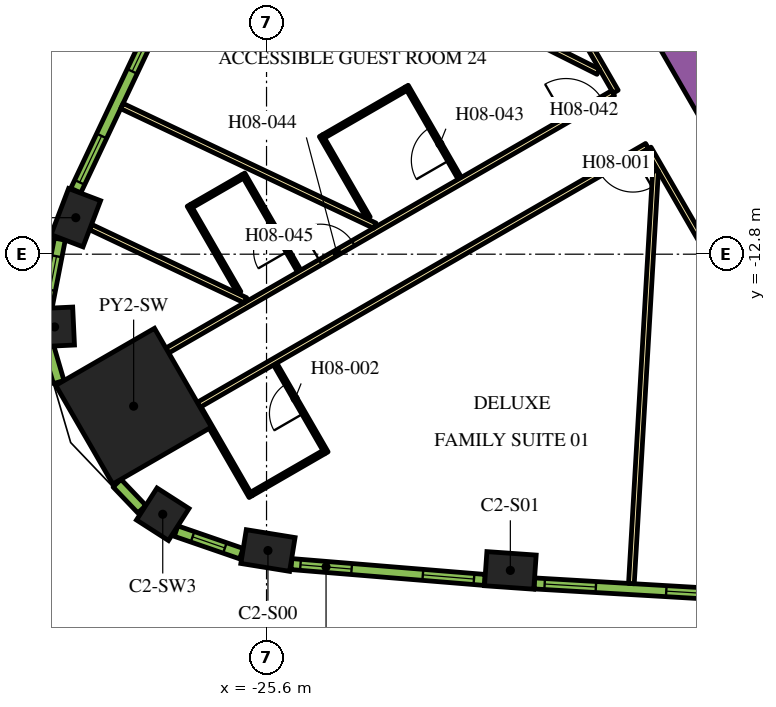
"""IFC4 building model, lengths in metres.
Left out: names, types, materials, properties, quantities, classifications, styles, units other than length and angle.
Written with IfcOpenShell. Run it as: python <this file> out.ifc"""

import sys

from ifc_helpers import new_model, si_unit, direction, frame, frame_2d, origin, origin_2d, place, context, subcontext, project, spatial, rectangle, extrude, element, fill, save


model = new_model("IFC4")
c1 = context("Model", 3, precision=1e-05, world=origin(), true_north=direction((0.0, 1.0)))
c2 = subcontext(c1, "Body", "Model", "MODEL_VIEW")
j1 = project(units=[si_unit("LENGTHUNIT", "METRE"), si_unit("PLANEANGLEUNIT", "RADIAN")], contexts=[c1])
p1 = place(None, origin())
s1 = spatial("IfcSite", under=j1, at=p1, CompositionType="ELEMENT")
p2 = place(p1, origin())
s2 = spatial("IfcBuilding", under=s1, at=p2, CompositionType="ELEMENT")
p3 = place(p2, frame((0.0, 0.0, 111.0)))
s3 = spatial("IfcBuildingStorey", under=s2, at=p3, CompositionType="ELEMENT", Elevation=111.0)
p4 = place(p3, frame((-29.097, -16.799, 0.0), z_axis=(0.0, 0.0, 1.0), x_axis=(-0.866025403784, -0.5, 0.0)))
e1 = element("IfcColumn", 1, at=p4, inside=s3, PredefinedType="COLUMN", context=c2, shape_type="SweptSolid", body=[
    extrude(rectangle(XDim=3.0, YDim=3.0, at=origin_2d()), origin(), (0.0, 0.0, 1.0), 3.9),
])
for number, where, z_axis, x_axis in (
    (2, (-25.563, -20.597, 0.0), (0.0, 0.0, 1.0), (0.987, -0.159, 0.0)),
    (3, (-19.184, -21.12, 0.0), (0.0, 0.0, 1.0), (0.998, -0.07, 0.0)),
    (4, (-30.619, -11.839, 0.0), (0.0, 0.0, 1.0), (-0.355, -0.935, 0.0)),
):
    element("IfcColumn", number, at=place(p3, frame(where, z_axis=z_axis, x_axis=x_axis)), inside=s3, PredefinedType="COLUMN", context=c2, shape_type="SweptSolid", body=[
        extrude(rectangle(XDim=1.3, YDim=0.9, at=origin_2d()), origin(), (0.0, 0.0, 1.0), 3.9),
    ])
for number, where, z_axis, x_axis in (
    (5, (-31.177, -14.714, 0.0), (0.0, 0.0, 1.0), (0.047, -0.999, 0.0)),
    (6, (-28.331, -19.643, 0.0), (0.0, 0.0, 1.0), (0.842, -0.54, 0.0)),
):
    element("IfcColumn", number, at=place(p3, frame(where, z_axis=z_axis, x_axis=x_axis)), inside=s3, PredefinedType="COLUMN", context=c2, shape_type="SweptSolid", body=[
        extrude(rectangle(XDim=1.0, YDim=1.0, at=origin_2d()), origin(), (0.0, 0.0, 1.0), 3.9),
    ])
p5 = place(p3, frame((-12.134, -11.883, 0.0), z_axis=(0.0, 0.0, 1.0), x_axis=(-0.500005339912, 0.866022320763, 0.0)))
e7 = element("IfcWall", 7, at=p5, inside=s3, PredefinedType="SOLIDWALL", context=c2, shape_type="SweptSolid", body=[
    extrude(rectangle(XDim=9.488, YDim=0.9, at=frame_2d((4.744, 0.0))), origin(), (0.0, 0.0, 1.0), 3.9),
])
p6 = place(p3, frame((-12.885, -9.431, 0.0), z_axis=(0.0, 0.0, 1.0), x_axis=(-0.500020560727, 0.866013532718, 0.0)))
e8 = element("IfcWall", 8, at=p6, inside=s3, PredefinedType="SOLIDWALL", context=c2, shape_type="SweptSolid", body=[
    extrude(rectangle(XDim=3.45, YDim=0.25, at=frame_2d((1.725, 0.0))), origin(), (0.0, 0.0, 1.0), 3.9),
])
p7 = place(p3, frame((-16.412, -8.523, 0.0), z_axis=(0.0, 0.0, 1.0), x_axis=(-0.500001929737, 0.866024289647, 0.0)))
e9 = element("IfcWall", 9, at=p7, inside=s3, PredefinedType="PARTITIONING", context=c2, shape_type="SweptSolid", body=[
    extrude(rectangle(XDim=5.268, YDim=0.15, at=frame_2d((2.634, 0.0))), origin(), (0.0, 0.0, 1.0), 2.75),
])
p8 = place(p3, frame((-28.211, -15.335, 0.0), z_axis=(0.0, 0.0, 1.0), x_axis=(0.866025884867, 0.49999916674, 0.0)))
e10 = element("IfcWall", 10, at=p8, inside=s3, PredefinedType="PARTITIONING", context=c2, shape_type="SweptSolid", body=[
    extrude(rectangle(XDim=13.543, YDim=0.15, at=frame_2d((6.772, 0.0))), origin(), (0.0, 0.0, 1.0), 2.75),
])
p9 = place(p8, frame((12.114, 0.0, 0.0)))
e11 = element("IfcOpeningElement", 11, at=p9, cuts=e10, PredefinedType="OPENING", context=c2, shape_type="SweptSolid", body=[
    extrude(rectangle(XDim=1.1, YDim=2.1, at=frame_2d((0.55, 1.05))), frame((0.0, 0.085, 0.0), z_axis=(0.0, -1.0, 0.0), x_axis=(1.0, 0.0, 0.0)), (0.0, 0.0, 1.0), 0.17),
])
p10 = place(p8, frame((4.65, 0.0, 0.0)))
e12 = element("IfcOpeningElement", 12, at=p10, cuts=e10, PredefinedType="OPENING", context=c2, shape_type="SweptSolid", body=[
    extrude(rectangle(XDim=1.0, YDim=2.1, at=frame_2d((0.5, 1.05))), frame((0.0, 0.085, 0.0), z_axis=(0.0, -1.0, 0.0), x_axis=(1.0, 0.0, 0.0)), (0.0, 0.0, 1.0), 0.17),
])
p11 = place(p3, frame((-15.587, -9.952, 0.0), z_axis=(0.0, 0.0, 1.0), x_axis=(-0.866017869832, -0.500013048961, 0.0)))
e13 = element("IfcWall", 13, at=p11, inside=s3, PredefinedType="PARTITIONING", context=c2, shape_type="SweptSolid", body=[
    extrude(rectangle(XDim=13.624, YDim=0.15, at=frame_2d((6.812, 0.0))), origin(), (0.0, 0.0, 1.0), 2.75),
])
p12 = place(p11, frame((0.427, 0.0, 0.0)))
e14 = element("IfcOpeningElement", 14, at=p12, cuts=e13, PredefinedType="OPENING", context=c2, shape_type="SweptSolid", body=[
    extrude(rectangle(XDim=1.0, YDim=2.1, at=frame_2d((0.5, 1.05))), frame((0.0, 0.085, 0.0), z_axis=(0.0, -1.0, 0.0), x_axis=(1.0, 0.0, 0.0)), (0.0, 0.0, 1.0), 0.17),
])
p13 = place(p3, frame((-12.918, -14.575, 0.0), z_axis=(0.0, 0.0, 1.0), x_axis=(-0.500009150678, 0.866020120573, 0.0)))
e15 = element("IfcWall", 15, at=p13, inside=s3, PredefinedType="PARTITIONING", context=c2, shape_type="SweptSolid", body=[
    extrude(rectangle(XDim=5.258, YDim=0.15, at=frame_2d((2.629, 0.0))), origin(), (0.0, 0.0, 1.0), 2.75),
])
p14 = place(p3, frame((-30.231, -12.085, 0.0), z_axis=(0.0, 0.0, 1.0), x_axis=(0.904001132572, -0.427530060122, 0.0)))
e16 = element("IfcWall", 16, at=p14, inside=s3, PredefinedType="PARTITIONING", context=c2, shape_type="SweptSolid", body=[
    extrude(rectangle(XDim=4.51, YDim=0.15, at=frame_2d((2.255, 0.0))), origin(), (0.0, 0.0, 1.0), 2.75),
])
p15 = place(p3, frame((-29.406, -8.901, 0.0), z_axis=(0.0, 0.0, 1.0), x_axis=(0.904002363742, -0.427527456836, 0.0)))
e17 = element("IfcWall", 17, at=p15, inside=s3, PredefinedType="PARTITIONING", context=c2, shape_type="SweptSolid", body=[
    extrude(rectangle(XDim=7.362, YDim=0.15, at=frame_2d((3.681, 0.0))), origin(), (0.0, 0.0, 1.0), 2.75),
])
p16 = place(p3, frame((-26.591, -3.122, 0.0), z_axis=(0.0, 0.0, 1.0), x_axis=(0.893766213273, -0.448533115847, 0.0)))
e18 = element("IfcWall", 18, at=p16, inside=s3, PredefinedType="PARTITIONING", context=c2, shape_type="SweptSolid", body=[
    extrude(rectangle(XDim=10.875, YDim=0.15, at=frame_2d((5.438, 0.0))), origin(), (0.0, 0.0, 1.0), 2.75),
])
p17 = place(p3, frame((-15.999, -21.467, 0.0), z_axis=(0.0, 0.0, 1.0), x_axis=(0.058411453297, 0.998292593443, 0.0)))
e19 = element("IfcWall", 19, at=p17, inside=s3, PredefinedType="PARTITIONING", context=c2, shape_type="SweptSolid", body=[
    extrude(rectangle(XDim=10.875, YDim=0.15, at=frame_2d((5.438, 0.0))), origin(), (0.0, 0.0, 1.0), 2.75),
])
p18 = place(p3, frame((-24.024, -18.027, 0.0), z_axis=(0.0, 0.0, 1.0), x_axis=(-0.4999416173, 0.866059108428, 0.0)))
e20 = element("IfcWall", 20, at=p18, inside=s3, PredefinedType="PARTITIONING", context=c2, shape_type="SweptSolid", body=[
    extrude(rectangle(XDim=2.7, YDim=0.1, at=frame_2d((1.35, 0.0))), origin(), (0.0, 0.0, 1.0), 2.75),
])
p19 = place(p18, frame((1.2, 0.0, 0.0)))
e21 = element("IfcOpeningElement", 21, at=p19, cuts=e20, PredefinedType="OPENING", context=c2, shape_type="SweptSolid", body=[
    extrude(rectangle(XDim=0.9, YDim=2.1, at=frame_2d((0.45, 1.05))), frame((0.0, 0.06, 0.0), z_axis=(0.0, -1.0, 0.0), x_axis=(1.0, 0.0, 0.0)), (0.0, 0.0, 1.0), 0.12),
])
p20 = place(p3, frame((-24.092, -18.009, 0.0), z_axis=(0.0, 0.0, 1.0), x_axis=(-0.866083962871, -0.499898558967, 0.0)))
e22 = element("IfcWall", 22, at=p20, inside=s3, PredefinedType="PARTITIONING", context=c2, shape_type="SweptSolid", body=[
    extrude(rectangle(XDim=2.2, YDim=0.1, at=frame_2d((1.1, 0.0))), origin(), (0.0, 0.0, 1.0), 2.75),
])
p21 = place(p3, frame((-27.365, -16.839, 0.0), z_axis=(0.0, 0.0, 1.0), x_axis=(0.50000943426, -0.866019956843, 0.0)))
e23 = element("IfcWall", 23, at=p21, inside=s3, PredefinedType="PARTITIONING", context=c2, shape_type="SweptSolid", body=[
    extrude(rectangle(XDim=2.7, YDim=0.1, at=frame_2d((1.35, 0.0))), origin(), (0.0, 0.0, 1.0), 2.75),
])
p22 = place(p3, frame((-20.515, -10.805, 0.0), z_axis=(0.0, 0.0, 1.0), x_axis=(-0.49994636267, 0.866056369097, 0.0)))
e24 = element("IfcWall", 24, at=p22, inside=s3, PredefinedType="PARTITIONING", context=c2, shape_type="SweptSolid", body=[
    extrude(rectangle(XDim=2.8, YDim=0.1, at=frame_2d((1.4, 0.0))), origin(), (0.0, 0.0, 1.0), 2.75),
])
p23 = place(p22, frame((0.55, 0.0, 0.0)))
e25 = element("IfcOpeningElement", 25, at=p23, cuts=e24, PredefinedType="OPENING", context=c2, shape_type="SweptSolid", body=[
    extrude(rectangle(XDim=1.0, YDim=2.1, at=frame_2d((0.5, 1.05))), frame((0.0, 0.06, 0.0), z_axis=(0.0, -1.0, 0.0), x_axis=(1.0, 0.0, 0.0)), (0.0, 0.0, 1.0), 0.12),
])
for number, where, z_axis, x_axis in (
    (26, (-21.933, -8.448, 0.0), (0.0, 0.0, 1.0), (-0.866, -0.5, 0.0)),
    (27, (-22.916, -11.845, 0.0), (0.0, 0.0, 1.0), (-0.5, 0.866, 0.0)),
):
    element("IfcWall", number, at=place(p3, frame(where, z_axis=z_axis, x_axis=x_axis)), inside=s3, PredefinedType="PARTITIONING", context=c2, shape_type="SweptSolid", body=[
        extrude(rectangle(XDim=2.5, YDim=0.1, at=frame_2d((1.25, 0.0))), origin(), (0.0, 0.0, 1.0), 2.75),
    ])
p24 = place(p3, frame((-24.74, -13.244, 0.0), z_axis=(0.0, 0.0, 1.0), x_axis=(-0.500037662692, 0.866003658127, 0.0)))
e28 = element("IfcWall", 28, at=p24, inside=s3, PredefinedType="PARTITIONING", context=c2, shape_type="SweptSolid", body=[
    extrude(rectangle(XDim=2.95, YDim=0.1, at=frame_2d((1.475, 0.0))), origin(), (0.0, 0.0, 1.0), 2.75),
])
p25 = place(p24, frame((0.6, 0.0, 0.0)))
e29 = element("IfcOpeningElement", 29, at=p25, cuts=e28, PredefinedType="OPENING", context=c2, shape_type="SweptSolid", body=[
    extrude(rectangle(XDim=0.9, YDim=2.1, at=frame_2d((0.45, 1.05))), frame((0.0, 0.06, 0.0), z_axis=(0.0, -1.0, 0.0), x_axis=(1.0, 0.0, 0.0)), (0.0, 0.0, 1.0), 0.12),
])
p26 = place(p3, frame((-26.233, -10.758, 0.0), z_axis=(0.0, 0.0, 1.0), x_axis=(-0.866043940782, -0.499967891604, 0.0)))
e30 = element("IfcWall", 30, at=p26, inside=s3, PredefinedType="PARTITIONING", context=c2, shape_type="SweptSolid", body=[
    extrude(rectangle(XDim=1.55, YDim=0.1, at=frame_2d((0.775, 0.0))), origin(), (0.0, 0.0, 1.0), 2.75),
])
p27 = place(p3, frame((-26.319, -13.81, 0.0), z_axis=(0.0, 0.0, 1.0), x_axis=(-0.499953715521, 0.866052124492, 0.0)))
e31 = element("IfcWall", 31, at=p27, inside=s3, PredefinedType="PARTITIONING", context=c2, shape_type="SweptSolid", body=[
    extrude(rectangle(XDim=2.65, YDim=0.1, at=frame_2d((1.325, 0.0))), origin(), (0.0, 0.0, 1.0), 2.75),
])
p28 = place(p3, frame((-24.946, -20.954, 0.0), z_axis=(0.0, 0.0, 1.0), x_axis=(0.99665273362, -0.081751627308, 0.0)))
e32 = element("IfcWall", 32, at=p28, inside=s3, PredefinedType="SOLIDWALL", context=c2, shape_type="SweptSolid", body=[
    extrude(rectangle(XDim=5.107, YDim=0.29, at=frame_2d((2.553, 0.0))), origin(), (0.0, 0.0, 1.0), 3.65),
])
p29 = place(p28, frame((0.24, 0.0, 0.9)))
e33 = element("IfcOpeningElement", 33, at=p29, cuts=e32, PredefinedType="OPENING", context=c2, shape_type="SweptSolid", body=[
    extrude(rectangle(XDim=1.35, YDim=2.15, at=frame_2d((0.675, 1.075))), frame((0.0, 0.155, 0.0), z_axis=(0.0, -1.0, 0.0), x_axis=(1.0, 0.0, 0.0)), (0.0, 0.0, 1.0), 0.31),
])
p30 = place(p28, frame((3.471, 0.0, 0.9)))
e34 = element("IfcOpeningElement", 34, at=p30, cuts=e32, PredefinedType="OPENING", context=c2, shape_type="SweptSolid", body=[
    extrude(rectangle(XDim=1.35, YDim=2.15, at=frame_2d((0.675, 1.075))), frame((0.0, 0.155, 0.0), z_axis=(0.0, -1.0, 0.0), x_axis=(1.0, 0.0, 0.0)), (0.0, 0.0, 1.0), 0.31),
])
p31 = place(p3, frame((-18.553, -21.463, 0.0), z_axis=(0.0, 0.0, 1.0), x_axis=(0.998290511436, -0.058447025388, 0.0)))
e35 = element("IfcWall", 35, at=p31, inside=s3, PredefinedType="SOLIDWALL", context=c2, shape_type="SweptSolid", body=[
    extrude(rectangle(XDim=5.1, YDim=0.29, at=frame_2d((2.55, 0.0))), origin(), (0.0, 0.0, 1.0), 3.65),
])
p32 = place(p31, frame((0.273, 0.0, 0.9)))
e36 = element("IfcOpeningElement", 36, at=p32, cuts=e35, PredefinedType="OPENING", context=c2, shape_type="SweptSolid", body=[
    extrude(rectangle(XDim=1.35, YDim=2.15, at=frame_2d((0.675, 1.075))), frame((0.0, 0.155, 0.0), z_axis=(0.0, -1.0, 0.0), x_axis=(1.0, 0.0, 0.0)), (0.0, 0.0, 1.0), 0.31),
])
p33 = place(p31, frame((3.478, 0.0, 0.9)))
e37 = element("IfcOpeningElement", 37, at=p33, cuts=e35, PredefinedType="OPENING", context=c2, shape_type="SweptSolid", body=[
    extrude(rectangle(XDim=1.35, YDim=2.15, at=frame_2d((0.675, 1.075))), frame((0.0, 0.155, 0.0), z_axis=(0.0, -1.0, 0.0), x_axis=(1.0, 0.0, 0.0)), (0.0, 0.0, 1.0), 0.31),
])
p34 = place(p3, frame((-28.436, -6.511, 0.0), z_axis=(0.0, 0.0, 1.0), x_axis=(-0.427543726596, -0.903994669148, 0.0)))
e38 = element("IfcWall", 38, at=p34, inside=s3, PredefinedType="SOLIDWALL", context=c2, shape_type="SweptSolid", body=[
    extrude(rectangle(XDim=5.107, YDim=0.29, at=frame_2d((2.553, 0.0))), origin(), (0.0, 0.0, 1.0), 3.65),
])
p35 = place(p34, frame((0.285, 0.0, 0.9)))
e39 = element("IfcOpeningElement", 39, at=p35, cuts=e38, PredefinedType="OPENING", context=c2, shape_type="SweptSolid", body=[
    extrude(rectangle(XDim=1.35, YDim=2.15, at=frame_2d((0.675, 1.075))), frame((0.0, 0.155, 0.0), z_axis=(0.0, -1.0, 0.0), x_axis=(1.0, 0.0, 0.0)), (0.0, 0.0, 1.0), 0.31),
])
p36 = place(p34, frame((3.516, 0.0, 0.9)))
e40 = element("IfcOpeningElement", 40, at=p36, cuts=e38, PredefinedType="OPENING", context=c2, shape_type="SweptSolid", body=[
    extrude(rectangle(XDim=1.35, YDim=2.15, at=frame_2d((0.675, 1.075))), frame((0.0, 0.155, 0.0), z_axis=(0.0, -1.0, 0.0), x_axis=(1.0, 0.0, 0.0)), (0.0, 0.0, 1.0), 0.31),
])
p37 = place(p3, frame((-31.039, -12.403, 0.0), z_axis=(0.0, 0.0, 1.0), x_axis=(-0.190409913989, -0.981704672829, 0.0)))
e41 = element("IfcWall", 41, at=p37, inside=s3, PredefinedType="SOLIDWALL", context=c2, shape_type="SweptSolid", body=[
    extrude(rectangle(XDim=1.819, YDim=0.29, at=frame_2d((0.91, 0.0))), origin(), (0.0, 0.0, 1.0), 3.65),
])
p38 = place(p37, frame((0.46, 0.0, 0.9)))
e42 = element("IfcOpeningElement", 42, at=p38, cuts=e41, PredefinedType="OPENING", context=c2, shape_type="SweptSolid", body=[
    extrude(rectangle(XDim=0.9, YDim=2.15, at=frame_2d((0.45, 1.075))), frame((0.0, 0.155, 0.0), z_axis=(0.0, -1.0, 0.0), x_axis=(1.0, 0.0, 0.0)), (0.0, 0.0, 1.0), 0.31),
])
p39 = place(p3, frame((-31.336, -15.256, 0.0), z_axis=(0.0, 0.0, 1.0), x_axis=(0.281454582132, -0.95957455062, 0.0)))
e43 = element("IfcWall", 43, at=p39, inside=s3, PredefinedType="SOLIDWALL", context=c2, shape_type="SweptSolid", body=[
    extrude(rectangle(XDim=0.947, YDim=0.29, at=frame_2d((0.474, 0.0))), origin(), (0.0, 0.0, 1.0), 3.65),
])
p40 = place(p3, frame((-29.534, -18.824, 0.0), z_axis=(0.0, 0.0, 1.0), x_axis=(0.690414427296, -0.723414071319, 0.0)))
e44 = element("IfcWall", 44, at=p40, inside=s3, PredefinedType="SOLIDWALL", context=c2, shape_type="SweptSolid", body=[
    extrude(rectangle(XDim=0.947, YDim=0.29, at=frame_2d((0.474, 0.0))), origin(), (0.0, 0.0, 1.0), 3.65),
])
p41 = place(p3, frame((-27.981, -20.086, 0.0), z_axis=(0.0, 0.0, 1.0), x_axis=(0.945385815453, -0.325953462844, 0.0)))
e45 = element("IfcWall", 45, at=p41, inside=s3, PredefinedType="SOLIDWALL", context=c2, shape_type="SweptSolid", body=[
    extrude(rectangle(XDim=1.819, YDim=0.29, at=frame_2d((0.91, 0.0))), origin(), (0.0, 0.0, 1.0), 3.65),
])
p42 = place(p41, frame((0.46, 0.0, 0.9)))
e46 = element("IfcOpeningElement", 46, at=p42, cuts=e45, PredefinedType="OPENING", context=c2, shape_type="SweptSolid", body=[
    extrude(rectangle(XDim=0.9, YDim=2.15, at=frame_2d((0.45, 1.075))), frame((0.0, 0.155, 0.0), z_axis=(0.0, -1.0, 0.0), x_axis=(1.0, 0.0, 0.0)), (0.0, 0.0, 1.0), 0.31),
])
p43 = place(p12, origin())
e47 = element("IfcDoor", 47, at=p43, inside=s3, OperationType="SINGLE_SWING_LEFT", PredefinedType="DOOR", context=c2, shape_type="SweptSolid", body=[
    extrude(rectangle(XDim=1.0, YDim=2.1, at=frame_2d((0.5, 1.05))), frame((0.0, 0.025, 0.0), z_axis=(0.0, -1.0, 0.0), x_axis=(1.0, 0.0, 0.0)), (0.0, 0.0, 1.0), 0.05),
])
fill(e14, e47)
p44 = place(p19, origin())
e48 = element("IfcDoor", 48, at=p44, inside=s3, OperationType="SINGLE_SWING_LEFT", PredefinedType="DOOR", context=c2, shape_type="SweptSolid", body=[
    extrude(rectangle(XDim=0.9, YDim=2.1, at=frame_2d((0.45, 1.05))), frame((0.0, 0.025, 0.0), z_axis=(0.0, -1.0, 0.0), x_axis=(1.0, 0.0, 0.0)), (0.0, 0.0, 1.0), 0.05),
])
fill(e21, e48)
p45 = place(p9, origin())
e49 = element("IfcDoor", 49, at=p45, inside=s3, OperationType="SINGLE_SWING_RIGHT", PredefinedType="DOOR", context=c2, shape_type="SweptSolid", body=[
    extrude(rectangle(XDim=1.1, YDim=2.1, at=frame_2d((0.55, 1.05))), frame((0.0, 0.025, 0.0), z_axis=(0.0, -1.0, 0.0), x_axis=(1.0, 0.0, 0.0)), (0.0, 0.0, 1.0), 0.05),
])
fill(e11, e49)
p46 = place(p23, origin())
e50 = element("IfcDoor", 50, at=p46, inside=s3, OperationType="SINGLE_SWING_RIGHT", PredefinedType="DOOR", context=c2, shape_type="SweptSolid", body=[
    extrude(rectangle(XDim=1.0, YDim=2.1, at=frame_2d((0.5, 1.05))), frame((0.0, 0.025, 0.0), z_axis=(0.0, -1.0, 0.0), x_axis=(1.0, 0.0, 0.0)), (0.0, 0.0, 1.0), 0.05),
])
fill(e25, e50)
p47 = place(p10, origin())
e51 = element("IfcDoor", 51, at=p47, inside=s3, OperationType="SINGLE_SWING_RIGHT", PredefinedType="DOOR", context=c2, shape_type="SweptSolid", body=[
    extrude(rectangle(XDim=1.0, YDim=2.1, at=frame_2d((0.5, 1.05))), frame((0.0, 0.025, 0.0), z_axis=(0.0, -1.0, 0.0), x_axis=(1.0, 0.0, 0.0)), (0.0, 0.0, 1.0), 0.05),
])
fill(e12, e51)
p48 = place(p25, origin())
e52 = element("IfcDoor", 52, at=p48, inside=s3, OperationType="SINGLE_SWING_LEFT", PredefinedType="DOOR", context=c2, shape_type="SweptSolid", body=[
    extrude(rectangle(XDim=0.9, YDim=2.1, at=frame_2d((0.45, 1.05))), frame((0.0, 0.025, 0.0), z_axis=(0.0, -1.0, 0.0), x_axis=(1.0, 0.0, 0.0)), (0.0, 0.0, 1.0), 0.05),
])
fill(e29, e52)
p49 = place(p29, origin())
e53 = element("IfcWindow", 53, at=p49, inside=s3, PartitioningType="DOUBLE_PANEL_VERTICAL", PredefinedType="WINDOW", context=c2, shape_type="SweptSolid", body=[
    extrude(rectangle(XDim=1.35, YDim=2.15, at=frame_2d((0.675, 1.075))), frame((0.0, 0.015, 0.0), z_axis=(0.0, -1.0, 0.0), x_axis=(1.0, 0.0, 0.0)), (0.0, 0.0, 1.0), 0.06),
])
fill(e33, e53)
p50 = place(p30, origin())
e54 = element("IfcWindow", 54, at=p50, inside=s3, PartitioningType="DOUBLE_PANEL_VERTICAL", PredefinedType="WINDOW", context=c2, shape_type="SweptSolid", body=[
    extrude(rectangle(XDim=1.35, YDim=2.15, at=frame_2d((0.675, 1.075))), frame((0.0, 0.015, 0.0), z_axis=(0.0, -1.0, 0.0), x_axis=(1.0, 0.0, 0.0)), (0.0, 0.0, 1.0), 0.06),
])
fill(e34, e54)
p51 = place(p32, origin())
e55 = element("IfcWindow", 55, at=p51, inside=s3, PartitioningType="DOUBLE_PANEL_VERTICAL", PredefinedType="WINDOW", context=c2, shape_type="SweptSolid", body=[
    extrude(rectangle(XDim=1.35, YDim=2.15, at=frame_2d((0.675, 1.075))), frame((0.0, 0.015, 0.0), z_axis=(0.0, -1.0, 0.0), x_axis=(1.0, 0.0, 0.0)), (0.0, 0.0, 1.0), 0.06),
])
fill(e36, e55)
p52 = place(p33, origin())
e56 = element("IfcWindow", 56, at=p52, inside=s3, PartitioningType="DOUBLE_PANEL_VERTICAL", PredefinedType="WINDOW", context=c2, shape_type="SweptSolid", body=[
    extrude(rectangle(XDim=1.35, YDim=2.15, at=frame_2d((0.675, 1.075))), frame((0.0, 0.015, 0.0), z_axis=(0.0, -1.0, 0.0), x_axis=(1.0, 0.0, 0.0)), (0.0, 0.0, 1.0), 0.06),
])
fill(e37, e56)
p53 = place(p35, origin())
e57 = element("IfcWindow", 57, at=p53, inside=s3, PartitioningType="DOUBLE_PANEL_VERTICAL", PredefinedType="WINDOW", context=c2, shape_type="SweptSolid", body=[
    extrude(rectangle(XDim=1.35, YDim=2.15, at=frame_2d((0.675, 1.075))), frame((0.0, 0.015, 0.0), z_axis=(0.0, -1.0, 0.0), x_axis=(1.0, 0.0, 0.0)), (0.0, 0.0, 1.0), 0.06),
])
fill(e39, e57)
p54 = place(p36, origin())
e58 = element("IfcWindow", 58, at=p54, inside=s3, PartitioningType="DOUBLE_PANEL_VERTICAL", PredefinedType="WINDOW", context=c2, shape_type="SweptSolid", body=[
    extrude(rectangle(XDim=1.35, YDim=2.15, at=frame_2d((0.675, 1.075))), frame((0.0, 0.015, 0.0), z_axis=(0.0, -1.0, 0.0), x_axis=(1.0, 0.0, 0.0)), (0.0, 0.0, 1.0), 0.06),
])
fill(e40, e58)
p55 = place(p38, origin())
e59 = element("IfcWindow", 59, at=p55, inside=s3, PartitioningType="SINGLE_PANEL", PredefinedType="WINDOW", context=c2, shape_type="SweptSolid", body=[
    extrude(rectangle(XDim=0.9, YDim=2.15, at=frame_2d((0.45, 1.075))), frame((0.0, 0.015, 0.0), z_axis=(0.0, -1.0, 0.0), x_axis=(1.0, 0.0, 0.0)), (0.0, 0.0, 1.0), 0.06),
])
fill(e42, e59)
p56 = place(p42, origin())
e60 = element("IfcWindow", 60, at=p56, inside=s3, PartitioningType="SINGLE_PANEL", PredefinedType="WINDOW", context=c2, shape_type="SweptSolid", body=[
    extrude(rectangle(XDim=0.9, YDim=2.15, at=frame_2d((0.45, 1.075))), frame((0.0, 0.015, 0.0), z_axis=(0.0, -1.0, 0.0), x_axis=(1.0, 0.0, 0.0)), (0.0, 0.0, 1.0), 0.06),
])
fill(e46, e60)
save(model, sys.argv[1])
